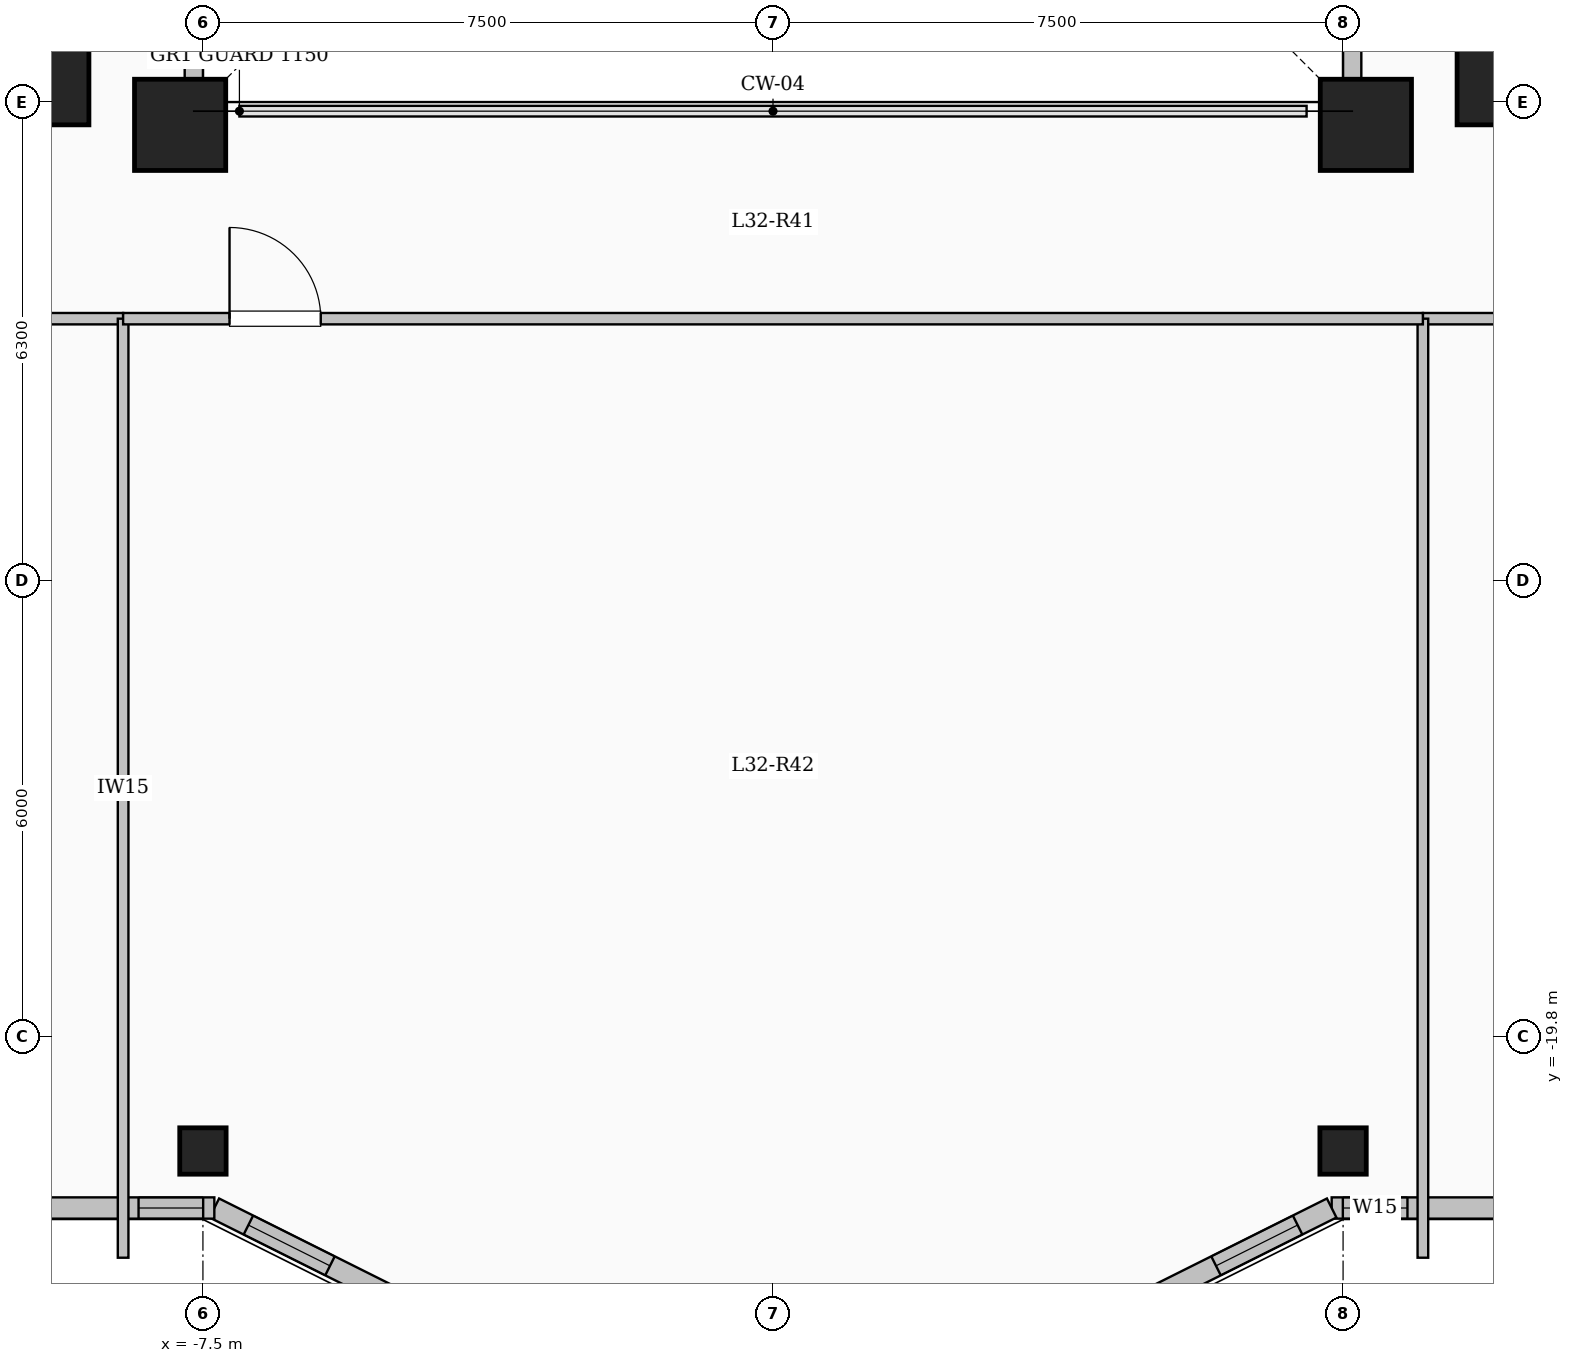
"""IFC4 building model, lengths in metres.
Left out: names, types, materials, properties, quantities, classifications, styles, units other than length and angle.
Written with IfcOpenShell. Run it as: python <this file> out.ifc"""

import sys

from ifc_helpers import new_model, si_unit, direction, frame, frame_2d, origin, origin_2d, place, context, subcontext, project, spatial, rectangle, hollow_circle, extrude, element, fill, save


model = new_model("IFC4")
c1 = context("Model", 3, precision=1e-05, world=origin(), true_north=direction((0.0, 1.0)))
c2 = subcontext(c1, "Body", "Model", "MODEL_VIEW")
j1 = project(units=[si_unit("LENGTHUNIT", "METRE"), si_unit("PLANEANGLEUNIT", "RADIAN")], contexts=[c1])
p1 = place(None, origin())
s1 = spatial("IfcSite", under=j1, at=p1, CompositionType="ELEMENT")
p2 = place(p1, origin())
s2 = spatial("IfcBuilding", under=s1, at=p2, CompositionType="ELEMENT")
p3 = place(p2, frame((0.0, 0.0, 118.5)))
s3 = spatial("IfcBuildingStorey", under=s2, at=p3, CompositionType="ELEMENT", Elevation=118.5)
for number, where, z_axis, x_axis in (
    (1, (-7.8, -7.8, 0.0), (0.0, 0.0, 1.0), (1.0, 0.0, 0.0)),
    (2, (7.8, -7.8, 0.0), (0.0, 0.0, 1.0), (1.0, 0.0, 0.0)),
    (3, (-9.6, -7.2, 0.0), (0.0, 0.0, 1.0), (1.0, 0.0, 0.0)),
    (4, (9.6, -7.2, 0.0), (0.0, 0.0, 1.0), (1.0, 0.0, 0.0)),
):
    element("IfcColumn", number, at=place(p3, frame(where, z_axis=z_axis, x_axis=x_axis)), inside=s3, PredefinedType="COLUMN", context=c2, shape_type="SweptSolid", body=[
        extrude(rectangle(XDim=1.2, YDim=1.2, at=origin_2d()), origin(), (0.0, 0.0, 1.0), 4.5),
    ])
for number, where, z_axis, x_axis in (
    (5, (-7.5, -21.3, 0.0), (0.0, 0.0, 1.0), (1.0, 0.0, 0.0)),
    (6, (7.5, -21.3, 0.0), (0.0, 0.0, 1.0), (1.0, 0.0, 0.0)),
):
    element("IfcColumn", number, at=place(p3, frame(where, z_axis=z_axis, x_axis=x_axis)), inside=s3, PredefinedType="COLUMN", context=c2, shape_type="SweptSolid", body=[
        extrude(hollow_circle(Radius=0.305, WallThickness=0.025, at=origin_2d()), origin(), (0.0, 0.0, 1.0), 4.5),
    ])
p4 = place(p3, frame((7.62, -7.62, 0.0), z_axis=(0.0, 0.0, 1.0), x_axis=(0.0, 1.0, 0.0)))
e7 = element("IfcWall", 7, at=p4, inside=s3, PredefinedType="SOLIDWALL", context=c2, shape_type="SweptSolid", body=[
    extrude(rectangle(XDim=15.24, YDim=0.24, at=frame_2d((7.62, 0.0))), origin(), (0.0, 0.0, 1.0), 4.2),
])
p5 = place(p4, frame((6.92, 0.0, 0.95)))
e8 = element("IfcOpeningElement", 8, at=p5, cuts=e7, PredefinedType="OPENING", context=c2, shape_type="SweptSolid", body=[
    extrude(rectangle(XDim=1.4, YDim=1.5, at=frame_2d((0.7, 0.75))), frame((0.0, 0.13, 0.0), z_axis=(0.0, -1.0, 0.0), x_axis=(1.0, 0.0, 0.0)), (0.0, 0.0, 1.0), 0.26),
])
p6 = place(p3, frame((-7.62, 7.62, 0.0), z_axis=(0.0, 0.0, 1.0), x_axis=(0.0, -1.0, 0.0)))
e9 = element("IfcWall", 9, at=p6, inside=s3, PredefinedType="SOLIDWALL", context=c2, shape_type="SweptSolid", body=[
    extrude(rectangle(XDim=15.24, YDim=0.24, at=frame_2d((7.62, 0.0))), origin(), (0.0, 0.0, 1.0), 4.2),
])
p7 = place(p6, frame((6.92, 0.0, 0.95)))
e10 = element("IfcOpeningElement", 10, at=p7, cuts=e9, PredefinedType="OPENING", context=c2, shape_type="SweptSolid", body=[
    extrude(rectangle(XDim=1.4, YDim=1.5, at=frame_2d((0.7, 0.75))), frame((0.0, 0.13, 0.0), z_axis=(0.0, -1.0, 0.0), x_axis=(1.0, 0.0, 0.0)), (0.0, 0.0, 1.0), 0.26),
])
p8 = place(p3, frame((21.15, -22.05, 0.0), z_axis=(0.0, 0.0, 1.0), x_axis=(-1.0, 0.0, 0.0)))
e11 = element("IfcWall", 11, at=p8, inside=s3, PredefinedType="SOLIDWALL", context=c2, shape_type="SweptSolid", body=[
    extrude(rectangle(XDim=13.8, YDim=0.28, at=frame_2d((6.9, 0.0))), origin(), (0.0, 0.0, 1.0), 4.2),
])
p9 = place(p8, frame((2.112, 0.0, 0.85)))
e12 = element("IfcOpeningElement", 12, at=p9, cuts=e11, PredefinedType="OPENING", context=c2, shape_type="SweptSolid", body=[
    extrude(rectangle(XDim=2.6, YDim=2.4, at=frame_2d((1.3, 1.2))), frame((0.0, 0.15, 0.0), z_axis=(0.0, -1.0, 0.0), x_axis=(1.0, 0.0, 0.0)), (0.0, 0.0, 1.0), 0.3),
])
p10 = place(p8, frame((8.41, 0.0, 0.85)))
e13 = element("IfcOpeningElement", 13, at=p10, cuts=e11, PredefinedType="OPENING", context=c2, shape_type="SweptSolid", body=[
    extrude(rectangle(XDim=2.6, YDim=2.4, at=frame_2d((1.3, 1.2))), frame((0.0, 0.15, 0.0), z_axis=(0.0, -1.0, 0.0), x_axis=(1.0, 0.0, 0.0)), (0.0, 0.0, 1.0), 0.3),
])
p11 = place(p8, frame((12.803, 0.0, 0.95)))
e14 = element("IfcOpeningElement", 14, at=p11, cuts=e11, PredefinedType="OPENING", context=c2, shape_type="SweptSolid", body=[
    extrude(rectangle(XDim=0.85, YDim=1.5, at=frame_2d((0.425, 0.75))), frame((0.0, 0.15, 0.0), z_axis=(0.0, -1.0, 0.0), x_axis=(1.0, 0.0, 0.0)), (0.0, 0.0, 1.0), 0.3),
])
p12 = place(p3, frame((7.35, -22.05, 0.0), z_axis=(0.0, 0.0, 1.0), x_axis=(-0.894427191, -0.4472135955, 0.0)))
e15 = element("IfcWall", 15, at=p12, inside=s3, PredefinedType="SOLIDWALL", context=c2, shape_type="SweptSolid", body=[
    extrude(rectangle(XDim=3.354, YDim=0.28, at=frame_2d((1.677, 0.0))), origin(), (0.0, 0.0, 1.0), 4.2),
])
p13 = place(p12, frame((0.501, 0.0, 0.95)))
e16 = element("IfcOpeningElement", 16, at=p13, cuts=e15, PredefinedType="OPENING", context=c2, shape_type="SweptSolid", body=[
    extrude(rectangle(XDim=1.2, YDim=1.5, at=frame_2d((0.6, 0.75))), frame((0.0, 0.15, 0.0), z_axis=(0.0, -1.0, 0.0), x_axis=(1.0, 0.0, 0.0)), (0.0, 0.0, 1.0), 0.3),
])
p14 = place(p3, frame((-4.35, -23.55, 0.0), z_axis=(0.0, 0.0, 1.0), x_axis=(-0.894427191, 0.4472135955, 0.0)))
e17 = element("IfcWall", 17, at=p14, inside=s3, PredefinedType="SOLIDWALL", context=c2, shape_type="SweptSolid", body=[
    extrude(rectangle(XDim=3.354, YDim=0.28, at=frame_2d((1.677, 0.0))), origin(), (0.0, 0.0, 1.0), 4.2),
])
p15 = place(p14, frame((1.653, 0.0, 0.95)))
e18 = element("IfcOpeningElement", 18, at=p15, cuts=e17, PredefinedType="OPENING", context=c2, shape_type="SweptSolid", body=[
    extrude(rectangle(XDim=1.2, YDim=1.5, at=frame_2d((0.6, 0.75))), frame((0.0, 0.15, 0.0), z_axis=(0.0, -1.0, 0.0), x_axis=(1.0, 0.0, 0.0)), (0.0, 0.0, 1.0), 0.3),
])
p16 = place(p3, frame((-7.35, -22.05, 0.0), z_axis=(0.0, 0.0, 1.0), x_axis=(-1.0, 0.0, 0.0)))
e19 = element("IfcWall", 19, at=p16, inside=s3, PredefinedType="SOLIDWALL", context=c2, shape_type="SweptSolid", body=[
    extrude(rectangle(XDim=13.8, YDim=0.28, at=frame_2d((6.9, 0.0))), origin(), (0.0, 0.0, 1.0), 4.2),
])
p17 = place(p16, frame((0.147, 0.0, 0.95)))
e20 = element("IfcOpeningElement", 20, at=p17, cuts=e19, PredefinedType="OPENING", context=c2, shape_type="SweptSolid", body=[
    extrude(rectangle(XDim=0.85, YDim=1.5, at=frame_2d((0.425, 0.75))), frame((0.0, 0.15, 0.0), z_axis=(0.0, -1.0, 0.0), x_axis=(1.0, 0.0, 0.0)), (0.0, 0.0, 1.0), 0.3),
])
p18 = place(p16, frame((2.664, 0.0, 0.85)))
e21 = element("IfcOpeningElement", 21, at=p18, cuts=e19, PredefinedType="OPENING", context=c2, shape_type="SweptSolid", body=[
    extrude(rectangle(XDim=2.6, YDim=2.4, at=frame_2d((1.3, 1.2))), frame((0.0, 0.15, 0.0), z_axis=(0.0, -1.0, 0.0), x_axis=(1.0, 0.0, 0.0)), (0.0, 0.0, 1.0), 0.3),
])
p19 = place(p16, frame((8.962, 0.0, 0.85)))
e22 = element("IfcOpeningElement", 22, at=p19, cuts=e19, PredefinedType="OPENING", context=c2, shape_type="SweptSolid", body=[
    extrude(rectangle(XDim=2.6, YDim=2.4, at=frame_2d((1.3, 1.2))), frame((0.0, 0.15, 0.0), z_axis=(0.0, -1.0, 0.0), x_axis=(1.0, 0.0, 0.0)), (0.0, 0.0, 1.0), 0.3),
])
p20 = place(p3, frame((-21.05, -10.35, 0.0), z_axis=(0.0, 0.0, 1.0), x_axis=(1.0, 0.0, 0.0)))
e23 = element("IfcWall", 23, at=p20, inside=s3, PredefinedType="PARTITIONING", context=c2, shape_type="SweptSolid", body=[
    extrude(rectangle(XDim=12.5, YDim=0.15, at=frame_2d((6.25, 0.0))), origin(), (0.0, 0.0, 1.0), 4.2),
])
p21 = place(p20, frame((1.1, 0.0, 0.0)))
e24 = element("IfcOpeningElement", 24, at=p21, cuts=e23, PredefinedType="OPENING", context=c2, shape_type="SweptSolid", body=[
    extrude(rectangle(XDim=1.08, YDim=2.15, at=frame_2d((0.54, 1.075))), frame((0.0, 0.085, 0.0), z_axis=(0.0, -1.0, 0.0), x_axis=(1.0, 0.0, 0.0)), (0.0, 0.0, 1.0), 0.17),
])
p22 = place(p20, frame((7.872, 0.0, 0.0)))
e25 = element("IfcOpeningElement", 25, at=p22, cuts=e23, PredefinedType="OPENING", context=c2, shape_type="SweptSolid", body=[
    extrude(rectangle(XDim=1.08, YDim=2.15, at=frame_2d((0.54, 1.075))), frame((0.0, 0.085, 0.0), z_axis=(0.0, -1.0, 0.0), x_axis=(1.0, 0.0, 0.0)), (0.0, 0.0, 1.0), 0.17),
])
p23 = place(p3, frame((8.55, -10.35, 0.0), z_axis=(0.0, 0.0, 1.0), x_axis=(1.0, 0.0, 0.0)))
e26 = element("IfcWall", 26, at=p23, inside=s3, PredefinedType="PARTITIONING", context=c2, shape_type="SweptSolid", body=[
    extrude(rectangle(XDim=12.5, YDim=0.15, at=frame_2d((6.25, 0.0))), origin(), (0.0, 0.0, 1.0), 4.2),
])
p24 = place(p23, frame((1.1, 0.0, 0.0)))
e27 = element("IfcOpeningElement", 27, at=p24, cuts=e26, PredefinedType="OPENING", context=c2, shape_type="SweptSolid", body=[
    extrude(rectangle(XDim=1.08, YDim=2.15, at=frame_2d((0.54, 1.075))), frame((0.0, 0.085, 0.0), z_axis=(0.0, -1.0, 0.0), x_axis=(1.0, 0.0, 0.0)), (0.0, 0.0, 1.0), 0.17),
])
p25 = place(p23, frame((6.777, 0.0, 0.0)))
e28 = element("IfcOpeningElement", 28, at=p25, cuts=e26, PredefinedType="OPENING", context=c2, shape_type="SweptSolid", body=[
    extrude(rectangle(XDim=1.2, YDim=2.15, at=frame_2d((0.6, 1.075))), frame((0.0, 0.085, 0.0), z_axis=(0.0, -1.0, 0.0), x_axis=(1.0, 0.0, 0.0)), (0.0, 0.0, 1.0), 0.17),
])
for number, where, z_axis, x_axis in (
    (29, (-8.55, -22.704, 0.0), (0.0, 0.0, 1.0), (0.0, 1.0, 0.0)),
    (30, (8.55, -22.704, 0.0), (0.0, 0.0, 1.0), (0.0, 1.0, 0.0)),
):
    element("IfcWall", number, at=place(p3, frame(where, z_axis=z_axis, x_axis=x_axis)), inside=s3, PredefinedType="PARTITIONING", context=c2, shape_type="SweptSolid", body=[
        extrude(rectangle(XDim=12.354, YDim=0.14, at=frame_2d((6.177, 0.0))), origin(), (0.0, 0.0, 1.0), 4.2),
    ])
p26 = place(p3, frame((-8.55, -10.35, 0.0), z_axis=(0.0, 0.0, 1.0), x_axis=(1.0, 0.0, 0.0)))
e31 = element("IfcWall", 31, at=p26, inside=s3, PredefinedType="PARTITIONING", context=c2, shape_type="SweptSolid", body=[
    extrude(rectangle(XDim=17.1, YDim=0.15, at=frame_2d((8.55, 0.0))), origin(), (0.0, 0.0, 1.0), 4.2),
])
p27 = place(p26, frame((1.4, 0.0, 0.0)))
e32 = element("IfcOpeningElement", 32, at=p27, cuts=e31, PredefinedType="OPENING", context=c2, shape_type="SweptSolid", body=[
    extrude(rectangle(XDim=1.2, YDim=2.15, at=frame_2d((0.6, 1.075))), frame((0.0, 0.085, 0.0), z_axis=(0.0, -1.0, 0.0), x_axis=(1.0, 0.0, 0.0)), (0.0, 0.0, 1.0), 0.17),
])
p28 = place(p11, origin())
e33 = element("IfcWindow", 33, at=p28, inside=s3, PartitioningType="SINGLE_PANEL", PredefinedType="WINDOW", context=c2, shape_type="SweptSolid", body=[
    extrude(rectangle(XDim=0.85, YDim=1.5, at=frame_2d((0.425, 0.75))), frame((0.0, 0.03, 0.0), z_axis=(0.0, -1.0, 0.0), x_axis=(1.0, 0.0, 0.0)), (0.0, 0.0, 1.0), 0.06),
])
fill(e14, e33)
p29 = place(p13, origin())
e34 = element("IfcWindow", 34, at=p29, inside=s3, PartitioningType="SINGLE_PANEL", PredefinedType="WINDOW", context=c2, shape_type="SweptSolid", body=[
    extrude(rectangle(XDim=1.2, YDim=1.5, at=frame_2d((0.6, 0.75))), frame((0.0, 0.03, 0.0), z_axis=(0.0, -1.0, 0.0), x_axis=(1.0, 0.0, 0.0)), (0.0, 0.0, 1.0), 0.06),
])
fill(e16, e34)
p30 = place(p15, origin())
e35 = element("IfcWindow", 35, at=p30, inside=s3, PartitioningType="SINGLE_PANEL", PredefinedType="WINDOW", context=c2, shape_type="SweptSolid", body=[
    extrude(rectangle(XDim=1.2, YDim=1.5, at=frame_2d((0.6, 0.75))), frame((0.0, 0.03, 0.0), z_axis=(0.0, -1.0, 0.0), x_axis=(1.0, 0.0, 0.0)), (0.0, 0.0, 1.0), 0.06),
])
fill(e18, e35)
p31 = place(p17, origin())
e36 = element("IfcWindow", 36, at=p31, inside=s3, PartitioningType="SINGLE_PANEL", PredefinedType="WINDOW", context=c2, shape_type="SweptSolid", body=[
    extrude(rectangle(XDim=0.85, YDim=1.5, at=frame_2d((0.425, 0.75))), frame((0.0, 0.03, 0.0), z_axis=(0.0, -1.0, 0.0), x_axis=(1.0, 0.0, 0.0)), (0.0, 0.0, 1.0), 0.06),
])
fill(e20, e36)
p32 = place(p27, origin())
e37 = element("IfcDoor", 37, at=p32, inside=s3, OperationType="SINGLE_SWING_LEFT", PredefinedType="DOOR", context=c2, shape_type="SweptSolid", body=[
    extrude(rectangle(XDim=1.2, YDim=2.15, at=frame_2d((0.6, 1.075))), frame((0.0, 0.025, 0.0), z_axis=(0.0, -1.0, 0.0), x_axis=(1.0, 0.0, 0.0)), (0.0, 0.0, 1.0), 0.05),
])
fill(e32, e37)
save(model, sys.argv[1])
